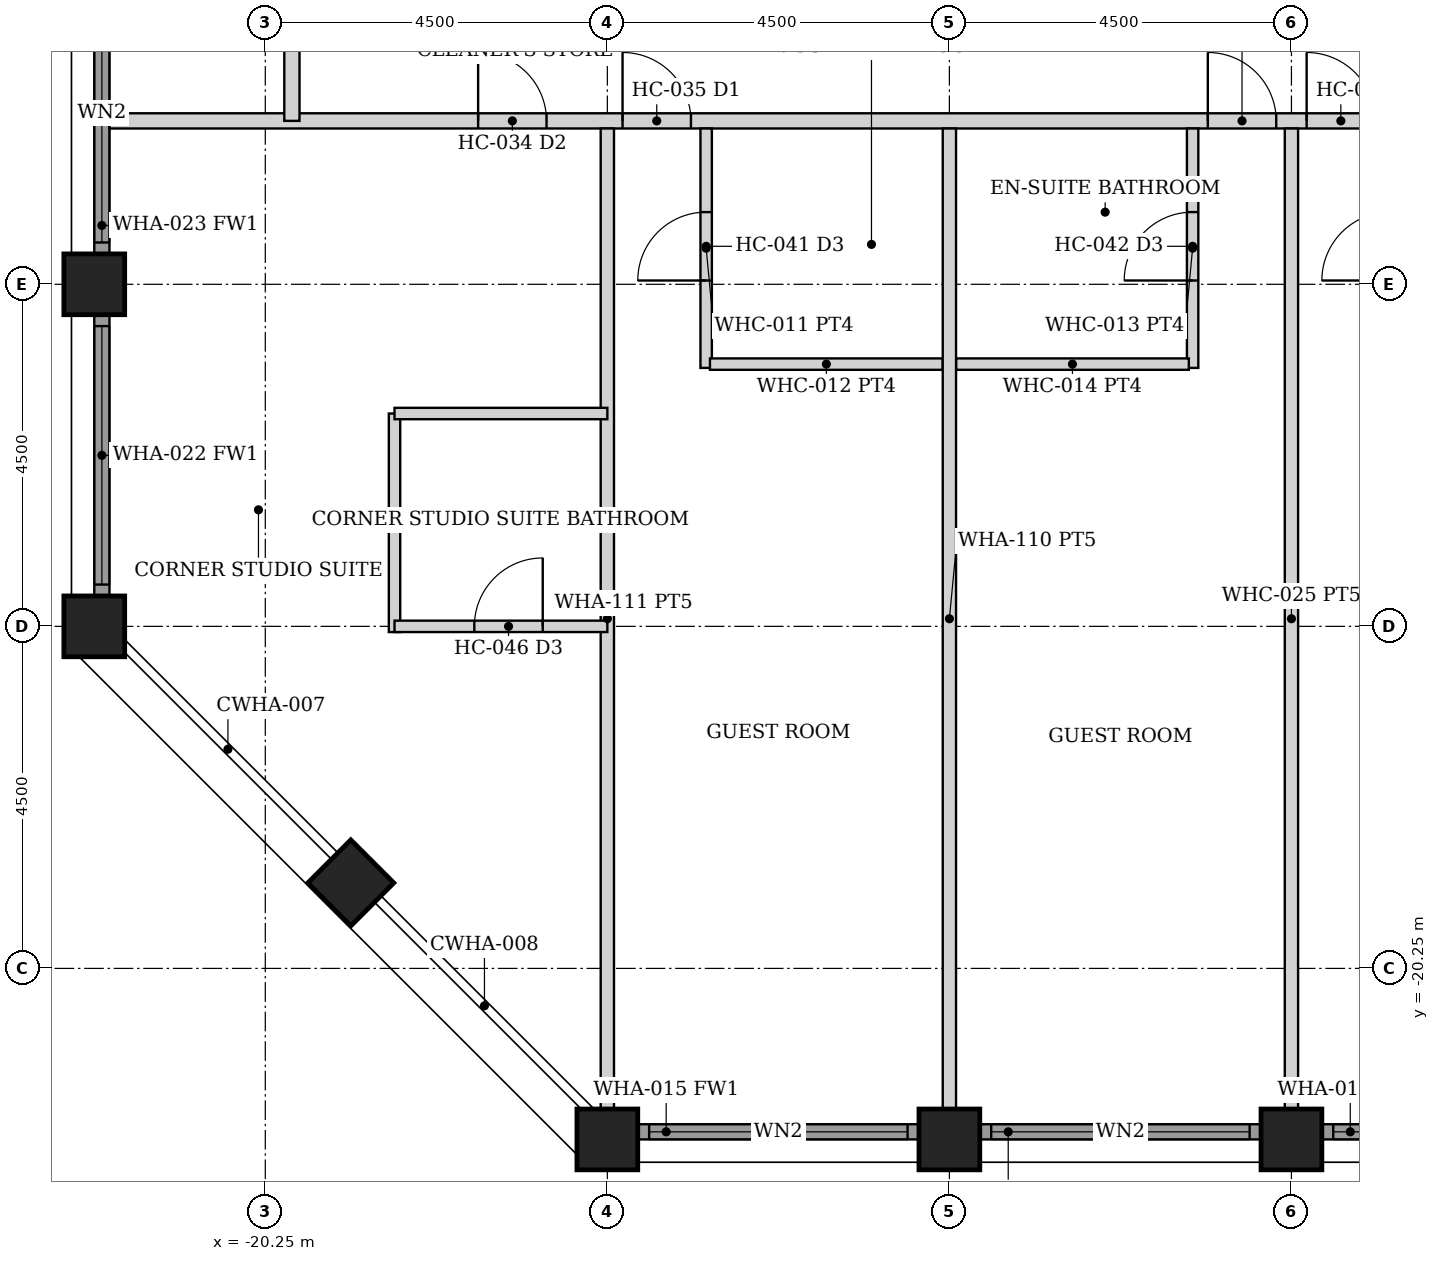
"""IFC4 building model, lengths in metres.
Left out: names, types, materials, properties, quantities, classifications, styles, units other than length and angle.
Written with IfcOpenShell. Run it as: python <this file> out.ifc"""

import sys

from ifc_helpers import new_model, si_unit, direction, frame, frame_2d, origin, origin_2d, place, context, subcontext, project, spatial, rectangle, hollow_rectangle, extrude, element, fill, save


model = new_model("IFC4")
c1 = context("Model", 3, precision=1e-05, world=origin(), true_north=direction((0.0, 1.0)))
c2 = subcontext(c1, "Body", "Model", "MODEL_VIEW")
j1 = project(units=[si_unit("LENGTHUNIT", "METRE"), si_unit("PLANEANGLEUNIT", "RADIAN")], contexts=[c1])
p1 = place(None, origin())
s1 = spatial("IfcSite", under=j1, at=p1, CompositionType="ELEMENT")
p2 = place(p1, origin())
s2 = spatial("IfcBuilding", under=s1, at=p2, CompositionType="ELEMENT")
p3 = place(p2, frame((0.0, 0.0, 140.0)))
s3 = spatial("IfcBuildingStorey", under=s2, at=p3, CompositionType="ELEMENT", Elevation=140.0)
for number, where, z_axis, x_axis in (
    (1, (-15.75, -22.5, 0.0), (0.0, 0.0, 1.0), (0.0, 1.0, 0.0)),
    (2, (-22.5, -15.75, 0.0), (0.0, 0.0, 1.0), (1.0, 0.0, 0.0)),
    (3, (-11.25, -22.5, 0.0), (0.0, 0.0, 1.0), (0.0, 1.0, 0.0)),
    (4, (-22.5, -11.25, 0.0), (0.0, 0.0, 1.0), (1.0, 0.0, 0.0)),
    (5, (-6.75, -22.5, 0.0), (0.0, 0.0, 1.0), (0.0, 1.0, 0.0)),
    (6, (-19.125, -19.125, 0.0), (0.0, 0.0, 1.0), (0.707, 0.707, 0.0)),
):
    element("IfcColumn", number, at=place(p3, frame(where, z_axis=z_axis, x_axis=x_axis)), inside=s3, PredefinedType="COLUMN", context=c2, shape_type="SweptSolid", body=[
        extrude(hollow_rectangle(XDim=0.8, YDim=0.8, WallThickness=0.05, at=origin_2d()), origin(), (0.0, 0.0, 1.0), 3.6),
    ])
p4 = place(p3, frame((-15.345, -22.4, 0.0), z_axis=(0.0, 0.0, 1.0), x_axis=(1.0, 0.0, 0.0)))
e7 = element("IfcWall", 7, at=p4, inside=s3, PredefinedType="SOLIDWALL", context=c2, shape_type="SweptSolid", body=[
    extrude(rectangle(XDim=3.69, YDim=0.2, at=frame_2d((1.845, 0.0))), origin(), (0.0, 0.0, 1.0), 2.479),
])
p5 = place(p4, frame((0.145, 0.0, 0.3)))
e8 = element("IfcOpeningElement", 8, at=p5, cuts=e7, PredefinedType="OPENING", context=c2, shape_type="SweptSolid", body=[
    extrude(rectangle(XDim=3.4, YDim=2.029, at=frame_2d((1.7, 1.015))), frame((0.0, 0.11, 0.0), z_axis=(0.0, -1.0, 0.0), x_axis=(1.0, 0.0, 0.0)), (0.0, 0.0, 1.0), 0.22),
])
p6 = place(p3, frame((-10.845, -22.4, 0.0), z_axis=(0.0, 0.0, 1.0), x_axis=(1.0, 0.0, 0.0)))
e9 = element("IfcWall", 9, at=p6, inside=s3, PredefinedType="SOLIDWALL", context=c2, shape_type="SweptSolid", body=[
    extrude(rectangle(XDim=3.69, YDim=0.2, at=frame_2d((1.845, 0.0))), origin(), (0.0, 0.0, 1.0), 2.479),
])
p7 = place(p6, frame((0.145, 0.0, 0.3)))
e10 = element("IfcOpeningElement", 10, at=p7, cuts=e9, PredefinedType="OPENING", context=c2, shape_type="SweptSolid", body=[
    extrude(rectangle(XDim=3.4, YDim=2.029, at=frame_2d((1.7, 1.015))), frame((0.0, 0.11, 0.0), z_axis=(0.0, -1.0, 0.0), x_axis=(1.0, 0.0, 0.0)), (0.0, 0.0, 1.0), 0.22),
])
p8 = place(p3, frame((-6.345, -22.4, 0.0), z_axis=(0.0, 0.0, 1.0), x_axis=(1.0, 0.0, 0.0)))
e11 = element("IfcWall", 11, at=p8, inside=s3, PredefinedType="SOLIDWALL", context=c2, shape_type="SweptSolid", body=[
    extrude(rectangle(XDim=3.69, YDim=0.2, at=frame_2d((1.845, 0.0))), origin(), (0.0, 0.0, 1.0), 2.479),
])
p9 = place(p8, frame((0.145, 0.0, 0.3)))
e12 = element("IfcOpeningElement", 12, at=p9, cuts=e11, PredefinedType="OPENING", context=c2, shape_type="SweptSolid", body=[
    extrude(rectangle(XDim=3.4, YDim=2.029, at=frame_2d((1.7, 1.015))), frame((0.0, 0.11, 0.0), z_axis=(0.0, -1.0, 0.0), x_axis=(1.0, 0.0, 0.0)), (0.0, 0.0, 1.0), 0.22),
])
p10 = place(p3, frame((-22.4, -15.345, 0.0), z_axis=(0.0, 0.0, 1.0), x_axis=(0.0, 1.0, 0.0)))
e13 = element("IfcWall", 13, at=p10, inside=s3, PredefinedType="SOLIDWALL", context=c2, shape_type="SweptSolid", body=[
    extrude(rectangle(XDim=3.69, YDim=0.2, at=frame_2d((1.845, 0.0))), origin(), (0.0, 0.0, 1.0), 2.479),
])
p11 = place(p10, frame((0.145, 0.0, 0.3)))
e14 = element("IfcOpeningElement", 14, at=p11, cuts=e13, PredefinedType="OPENING", context=c2, shape_type="SweptSolid", body=[
    extrude(rectangle(XDim=3.4, YDim=2.029, at=frame_2d((1.7, 1.015))), frame((0.0, 0.11, 0.0), z_axis=(0.0, -1.0, 0.0), x_axis=(1.0, 0.0, 0.0)), (0.0, 0.0, 1.0), 0.22),
])
p12 = place(p3, frame((-22.4, -10.845, 0.0), z_axis=(0.0, 0.0, 1.0), x_axis=(0.0, 1.0, 0.0)))
e15 = element("IfcWall", 15, at=p12, inside=s3, PredefinedType="SOLIDWALL", context=c2, shape_type="SweptSolid", body=[
    extrude(rectangle(XDim=3.69, YDim=0.2, at=frame_2d((1.845, 0.0))), origin(), (0.0, 0.0, 1.0), 2.479),
])
p13 = place(p12, frame((0.145, 0.0, 0.3)))
e16 = element("IfcOpeningElement", 16, at=p13, cuts=e15, PredefinedType="OPENING", context=c2, shape_type="SweptSolid", body=[
    extrude(rectangle(XDim=3.4, YDim=2.029, at=frame_2d((1.7, 1.015))), frame((0.0, 0.11, 0.0), z_axis=(0.0, -1.0, 0.0), x_axis=(1.0, 0.0, 0.0)), (0.0, 0.0, 1.0), 0.22),
])
p14 = place(p3, frame((-22.3, -9.1, 0.0), z_axis=(0.0, 0.0, 1.0), x_axis=(1.0, 0.0, 0.0)))
e17 = element("IfcWall", 17, at=p14, inside=s3, PredefinedType="PARTITIONING", context=c2, shape_type="SweptSolid", body=[
    extrude(rectangle(XDim=44.6, YDim=0.2, at=frame_2d((22.3, 0.0))), origin(), (0.0, 0.0, 1.0), 2.473),
])
p15 = place(p14, frame((6.75, 0.0, 0.0)))
e18 = element("IfcOpeningElement", 18, at=p15, cuts=e17, PredefinedType="OPENING", context=c2, shape_type="SweptSolid", body=[
    extrude(rectangle(XDim=0.9, YDim=2.1, at=frame_2d((0.45, 1.05))), frame((0.0, 0.11, 0.0), z_axis=(0.0, -1.0, 0.0), x_axis=(1.0, 0.0, 0.0)), (0.0, 0.0, 1.0), 0.22),
])
p16 = place(p14, frame((14.45, 0.0, 0.0)))
e19 = element("IfcOpeningElement", 19, at=p16, cuts=e17, PredefinedType="OPENING", context=c2, shape_type="SweptSolid", body=[
    extrude(rectangle(XDim=0.9, YDim=2.1, at=frame_2d((0.45, 1.05))), frame((0.0, 0.11, 0.0), z_axis=(0.0, -1.0, 0.0), x_axis=(1.0, 0.0, 0.0)), (0.0, 0.0, 1.0), 0.22),
])
p17 = place(p14, frame((15.75, 0.0, 0.0)))
e20 = element("IfcOpeningElement", 20, at=p17, cuts=e17, PredefinedType="OPENING", context=c2, shape_type="SweptSolid", body=[
    extrude(rectangle(XDim=0.9, YDim=2.1, at=frame_2d((0.45, 1.05))), frame((0.0, 0.11, 0.0), z_axis=(0.0, -1.0, 0.0), x_axis=(1.0, 0.0, 0.0)), (0.0, 0.0, 1.0), 0.22),
])
p18 = place(p14, frame((24.75, 0.0, 0.0)))
e21 = element("IfcOpeningElement", 21, at=p18, cuts=e17, PredefinedType="OPENING", context=c2, shape_type="SweptSolid", body=[
    extrude(rectangle(XDim=0.9, YDim=2.1, at=frame_2d((0.45, 1.05))), frame((0.0, 0.11, 0.0), z_axis=(0.0, -1.0, 0.0), x_axis=(1.0, 0.0, 0.0)), (0.0, 0.0, 1.0), 0.22),
])
p19 = place(p14, frame((36.95, 0.0, 0.0)))
e22 = element("IfcOpeningElement", 22, at=p19, cuts=e17, PredefinedType="OPENING", context=c2, shape_type="SweptSolid", body=[
    extrude(rectangle(XDim=0.9, YDim=2.1, at=frame_2d((0.45, 1.05))), frame((0.0, 0.11, 0.0), z_axis=(0.0, -1.0, 0.0), x_axis=(1.0, 0.0, 0.0)), (0.0, 0.0, 1.0), 0.22),
])
p20 = place(p14, frame((38.85, 0.0, 0.0)))
e23 = element("IfcOpeningElement", 23, at=p20, cuts=e17, PredefinedType="OPENING", context=c2, shape_type="SweptSolid", body=[
    extrude(rectangle(XDim=0.9, YDim=2.1, at=frame_2d((0.45, 1.05))), frame((0.0, 0.11, 0.0), z_axis=(0.0, -1.0, 0.0), x_axis=(1.0, 0.0, 0.0)), (0.0, 0.0, 1.0), 0.22),
])
p21 = place(p14, frame((4.85, 0.0, 0.0)))
e24 = element("IfcOpeningElement", 24, at=p21, cuts=e17, PredefinedType="OPENING", context=c2, shape_type="SweptSolid", body=[
    extrude(rectangle(XDim=0.9, YDim=2.1, at=frame_2d((0.45, 1.05))), frame((0.0, 0.11, 0.0), z_axis=(0.0, -1.0, 0.0), x_axis=(1.0, 0.0, 0.0)), (0.0, 0.0, 1.0), 0.22),
])
p22 = place(p3, frame((-19.9, -9.1, 0.0), z_axis=(0.0, 0.0, 1.0), x_axis=(0.0, 1.0, 0.0)))
e25 = element("IfcWall", 25, at=p22, inside=s3, PredefinedType="PARTITIONING", context=c2, shape_type="SweptSolid", body=[
    extrude(rectangle(XDim=6.9, YDim=0.2, at=frame_2d((3.45, 0.0))), origin(), (0.0, 0.0, 1.0), 2.473),
])
p23 = place(p22, frame((3.075, 0.0, 0.0)))
e26 = element("IfcOpeningElement", 26, at=p23, cuts=e25, PredefinedType="OPENING", context=c2, shape_type="SweptSolid", body=[
    extrude(rectangle(XDim=0.8, YDim=2.1, at=frame_2d((0.4, 1.05))), frame((0.0, 0.11, 0.0), z_axis=(0.0, -1.0, 0.0), x_axis=(1.0, 0.0, 0.0)), (0.0, 0.0, 1.0), 0.22),
])
p24 = place(p3, frame((-14.45, -12.35, 0.0), z_axis=(0.0, 0.0, 1.0), x_axis=(0.0, 1.0, 0.0)))
e27 = element("IfcWall", 27, at=p24, inside=s3, PredefinedType="PARTITIONING", context=c2, shape_type="SweptSolid", body=[
    extrude(rectangle(XDim=3.15, YDim=0.15, at=frame_2d((1.575, 0.0))), origin(), (0.0, 0.0, 1.0), 2.473),
])
p25 = place(p24, frame((1.15, 0.0, 0.0)))
e28 = element("IfcOpeningElement", 28, at=p25, cuts=e27, PredefinedType="OPENING", context=c2, shape_type="SweptSolid", body=[
    extrude(rectangle(XDim=0.9, YDim=2.1, at=frame_2d((0.45, 1.05))), frame((0.0, 0.085, 0.0), z_axis=(0.0, -1.0, 0.0), x_axis=(1.0, 0.0, 0.0)), (0.0, 0.0, 1.0), 0.17),
])
p26 = place(p3, frame((-14.4, -12.3, 0.0), z_axis=(0.0, 0.0, 1.0), x_axis=(1.0, 0.0, 0.0)))
e29 = element("IfcWall", 29, at=p26, inside=s3, PredefinedType="PARTITIONING", context=c2, shape_type="SweptSolid", body=[
    extrude(rectangle(XDim=3.062, YDim=0.15, at=frame_2d((1.531, 0.0))), origin(), (0.0, 0.0, 1.0), 2.473),
])
p27 = place(p3, frame((-8.05, -12.35, 0.0), z_axis=(0.0, 0.0, 1.0), x_axis=(0.0, 1.0, 0.0)))
e30 = element("IfcWall", 30, at=p27, inside=s3, PredefinedType="PARTITIONING", context=c2, shape_type="SweptSolid", body=[
    extrude(rectangle(XDim=3.15, YDim=0.15, at=frame_2d((1.575, 0.0))), origin(), (0.0, 0.0, 1.0), 2.473),
])
p28 = place(p27, frame((1.15, 0.0, 0.0)))
e31 = element("IfcOpeningElement", 31, at=p28, cuts=e30, PredefinedType="OPENING", context=c2, shape_type="SweptSolid", body=[
    extrude(rectangle(XDim=0.9, YDim=2.1, at=frame_2d((0.45, 1.05))), frame((0.0, 0.085, 0.0), z_axis=(0.0, -1.0, 0.0), x_axis=(1.0, 0.0, 0.0)), (0.0, 0.0, 1.0), 0.17),
])
p29 = place(p3, frame((-11.163, -12.3, 0.0), z_axis=(0.0, 0.0, 1.0), x_axis=(1.0, 0.0, 0.0)))
e32 = element("IfcWall", 32, at=p29, inside=s3, PredefinedType="PARTITIONING", context=c2, shape_type="SweptSolid", body=[
    extrude(rectangle(XDim=3.062, YDim=0.15, at=frame_2d((1.531, 0.0))), origin(), (0.0, 0.0, 1.0), 2.473),
])
for number, where, z_axis, x_axis in (
    (33, (-15.75, -22.1, 0.0), (0.0, 0.0, 1.0), (0.0, 1.0, 0.0)),
    (34, (-11.25, -22.1, 0.0), (0.0, 0.0, 1.0), (0.0, 1.0, 0.0)),
    (35, (-6.75, -22.1, 0.0), (0.0, 0.0, 1.0), (0.0, 1.0, 0.0)),
):
    element("IfcWall", number, at=place(p3, frame(where, z_axis=z_axis, x_axis=x_axis)), inside=s3, PredefinedType="PARTITIONING", context=c2, shape_type="SweptSolid", body=[
        extrude(rectangle(XDim=12.9, YDim=0.175, at=frame_2d((6.45, 0.0))), origin(), (0.0, 0.0, 1.0), 2.473),
    ])
p30 = place(p3, frame((-18.55, -15.825, 0.0), z_axis=(0.0, 0.0, 1.0), x_axis=(0.0, 1.0, 0.0)))
e36 = element("IfcWall", 36, at=p30, inside=s3, PredefinedType="PARTITIONING", context=c2, shape_type="SweptSolid", body=[
    extrude(rectangle(XDim=2.875, YDim=0.15, at=frame_2d((1.438, 0.0))), origin(), (0.0, 0.0, 1.0), 2.473),
])
p31 = place(p3, frame((-18.55, -12.95, 0.0), z_axis=(0.0, 0.0, 1.0), x_axis=(1.0, 0.0, 0.0)))
e37 = element("IfcWall", 37, at=p31, inside=s3, PredefinedType="PARTITIONING", context=c2, shape_type="SweptSolid", body=[
    extrude(rectangle(XDim=2.8, YDim=0.15, at=frame_2d((1.4, 0.0))), origin(), (0.0, 0.0, 1.0), 2.473),
])
p32 = place(p3, frame((-18.55, -15.75, 0.0), z_axis=(0.0, 0.0, 1.0), x_axis=(1.0, 0.0, 0.0)))
e38 = element("IfcWall", 38, at=p32, inside=s3, PredefinedType="PARTITIONING", context=c2, shape_type="SweptSolid", body=[
    extrude(rectangle(XDim=2.8, YDim=0.15, at=frame_2d((1.4, 0.0))), origin(), (0.0, 0.0, 1.0), 2.473),
])
p33 = place(p32, frame((1.05, 0.0, 0.0)))
e39 = element("IfcOpeningElement", 39, at=p33, cuts=e38, PredefinedType="OPENING", context=c2, shape_type="SweptSolid", body=[
    extrude(rectangle(XDim=0.9, YDim=2.1, at=frame_2d((0.45, 1.05))), frame((0.0, 0.085, 0.0), z_axis=(0.0, -1.0, 0.0), x_axis=(1.0, 0.0, 0.0)), (0.0, 0.0, 1.0), 0.17),
])
p34 = place(p5, origin())
e40 = element("IfcWindow", 40, at=p34, inside=s3, PartitioningType="SINGLE_PANEL", PredefinedType="WINDOW", context=c2, shape_type="SweptSolid", body=[
    extrude(rectangle(XDim=3.4, YDim=2.029, at=frame_2d((1.7, 1.015))), frame((0.0, 0.03, 0.0), z_axis=(0.0, -1.0, 0.0), x_axis=(1.0, 0.0, 0.0)), (0.0, 0.0, 1.0), 0.06),
])
fill(e8, e40)
p35 = place(p7, origin())
e41 = element("IfcWindow", 41, at=p35, inside=s3, PartitioningType="SINGLE_PANEL", PredefinedType="WINDOW", context=c2, shape_type="SweptSolid", body=[
    extrude(rectangle(XDim=3.4, YDim=2.029, at=frame_2d((1.7, 1.015))), frame((0.0, 0.03, 0.0), z_axis=(0.0, -1.0, 0.0), x_axis=(1.0, 0.0, 0.0)), (0.0, 0.0, 1.0), 0.06),
])
fill(e10, e41)
p36 = place(p9, origin())
e42 = element("IfcWindow", 42, at=p36, inside=s3, PartitioningType="SINGLE_PANEL", PredefinedType="WINDOW", context=c2, shape_type="SweptSolid", body=[
    extrude(rectangle(XDim=3.4, YDim=2.029, at=frame_2d((1.7, 1.015))), frame((0.0, 0.03, 0.0), z_axis=(0.0, -1.0, 0.0), x_axis=(1.0, 0.0, 0.0)), (0.0, 0.0, 1.0), 0.06),
])
fill(e12, e42)
p37 = place(p11, origin())
e43 = element("IfcWindow", 43, at=p37, inside=s3, PartitioningType="SINGLE_PANEL", PredefinedType="WINDOW", context=c2, shape_type="SweptSolid", body=[
    extrude(rectangle(XDim=3.4, YDim=2.029, at=frame_2d((1.7, 1.015))), frame((0.0, 0.03, 0.0), z_axis=(0.0, -1.0, 0.0), x_axis=(1.0, 0.0, 0.0)), (0.0, 0.0, 1.0), 0.06),
])
fill(e14, e43)
p38 = place(p13, origin())
e44 = element("IfcWindow", 44, at=p38, inside=s3, PartitioningType="SINGLE_PANEL", PredefinedType="WINDOW", context=c2, shape_type="SweptSolid", body=[
    extrude(rectangle(XDim=3.4, YDim=2.029, at=frame_2d((1.7, 1.015))), frame((0.0, 0.03, 0.0), z_axis=(0.0, -1.0, 0.0), x_axis=(1.0, 0.0, 0.0)), (0.0, 0.0, 1.0), 0.06),
])
fill(e16, e44)
p39 = place(p15, origin())
e45 = element("IfcDoor", 45, at=p39, inside=s3, OperationType="SINGLE_SWING_LEFT", PredefinedType="DOOR", context=c2, shape_type="SweptSolid", body=[
    extrude(rectangle(XDim=0.9, YDim=2.1, at=frame_2d((0.45, 1.05))), frame((0.0, 0.025, 0.0), z_axis=(0.0, -1.0, 0.0), x_axis=(1.0, 0.0, 0.0)), (0.0, 0.0, 1.0), 0.05),
])
fill(e18, e45)
p40 = place(p25, origin())
e46 = element("IfcDoor", 46, at=p40, inside=s3, OperationType="SINGLE_SWING_LEFT", PredefinedType="DOOR", context=c2, shape_type="SweptSolid", body=[
    extrude(rectangle(XDim=0.9, YDim=2.1, at=frame_2d((0.45, 1.05))), frame((0.0, 0.025, 0.0), z_axis=(0.0, -1.0, 0.0), x_axis=(1.0, 0.0, 0.0)), (0.0, 0.0, 1.0), 0.05),
])
fill(e28, e46)
p41 = place(p16, origin())
e47 = element("IfcDoor", 47, at=p41, inside=s3, OperationType="SINGLE_SWING_LEFT", PredefinedType="DOOR", context=c2, shape_type="SweptSolid", body=[
    extrude(rectangle(XDim=0.9, YDim=2.1, at=frame_2d((0.45, 1.05))), frame((0.0, 0.025, 0.0), z_axis=(0.0, -1.0, 0.0), x_axis=(1.0, 0.0, 0.0)), (0.0, 0.0, 1.0), 0.05),
])
fill(e19, e47)
p42 = place(p28, origin())
e48 = element("IfcDoor", 48, at=p42, inside=s3, OperationType="SINGLE_SWING_LEFT", PredefinedType="DOOR", context=c2, shape_type="SweptSolid", body=[
    extrude(rectangle(XDim=0.9, YDim=2.1, at=frame_2d((0.45, 1.05))), frame((0.0, 0.025, 0.0), z_axis=(0.0, -1.0, 0.0), x_axis=(1.0, 0.0, 0.0)), (0.0, 0.0, 1.0), 0.05),
])
fill(e31, e48)
p43 = place(p17, origin())
e49 = element("IfcDoor", 49, at=p43, inside=s3, OperationType="SINGLE_SWING_LEFT", PredefinedType="DOOR", context=c2, shape_type="SweptSolid", body=[
    extrude(rectangle(XDim=0.9, YDim=2.1, at=frame_2d((0.45, 1.05))), frame((0.0, 0.025, 0.0), z_axis=(0.0, -1.0, 0.0), x_axis=(1.0, 0.0, 0.0)), (0.0, 0.0, 1.0), 0.05),
])
fill(e20, e49)
p44 = place(p21, origin())
e50 = element("IfcDoor", 50, at=p44, inside=s3, OperationType="SINGLE_SWING_LEFT", PredefinedType="DOOR", context=c2, shape_type="SweptSolid", body=[
    extrude(rectangle(XDim=0.9, YDim=2.1, at=frame_2d((0.45, 1.05))), frame((0.0, 0.025, 0.0), z_axis=(0.0, -1.0, 0.0), x_axis=(1.0, 0.0, 0.0)), (0.0, 0.0, 1.0), 0.05),
])
fill(e24, e50)
p45 = place(p33, origin())
e51 = element("IfcDoor", 51, at=p45, inside=s3, OperationType="SINGLE_SWING_RIGHT", PredefinedType="DOOR", context=c2, shape_type="SweptSolid", body=[
    extrude(rectangle(XDim=0.9, YDim=2.1, at=frame_2d((0.45, 1.05))), frame((0.0, 0.025, 0.0), z_axis=(0.0, -1.0, 0.0), x_axis=(1.0, 0.0, 0.0)), (0.0, 0.0, 1.0), 0.05),
])
fill(e39, e51)
save(model, sys.argv[1])
